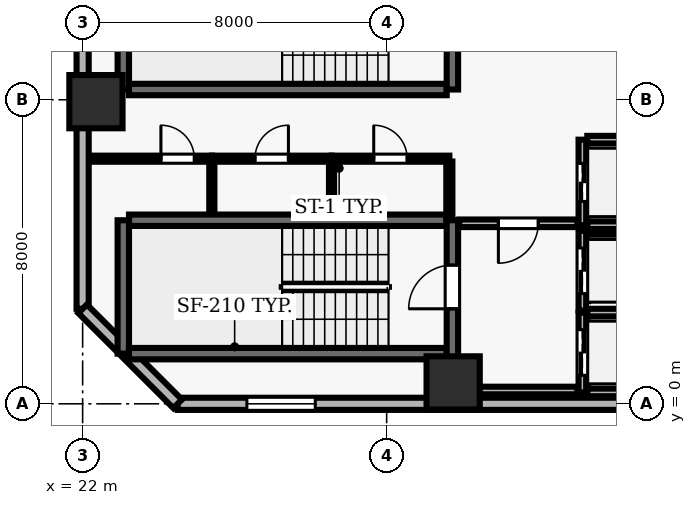
"""IFC4 building model, lengths in metres.
Left out: names, types, materials, properties, quantities, classifications, styles, units other than length and angle.
Written with IfcOpenShell. Run it as: python <this file> out.ifc"""

import sys

from ifc_helpers import new_model, si_unit, direction, frame, frame_2d, origin, origin_2d, place, context, subcontext, project, spatial, rectangle, extrude, element, fill, save


model = new_model("IFC4")
c1 = context("Model", 3, precision=1e-05, world=origin(), true_north=direction((0.0, 1.0)))
c2 = subcontext(c1, "Body", "Model", "MODEL_VIEW")
j1 = project(units=[si_unit("LENGTHUNIT", "METRE"), si_unit("PLANEANGLEUNIT", "RADIAN")], contexts=[c1])
p1 = place(None, origin())
s1 = spatial("IfcSite", under=j1, at=p1, CompositionType="ELEMENT")
p2 = place(p1, origin())
s2 = spatial("IfcBuilding", under=s1, at=p2, CompositionType="ELEMENT")
p3 = place(p2, frame((0.0, 0.0, 62.2)))
s3 = spatial("IfcBuildingStorey", under=s2, at=p3, CompositionType="ELEMENT", Elevation=62.2)
for number, where, z_axis, x_axis in (
    (1, (31.75, 0.55, 0.0), (0.0, 0.0, 1.0), (1.0, 0.0, 0.0)),
    (2, (22.35, 7.95, 0.0), (0.0, 0.0, 1.0), (1.0, 0.0, 0.0)),
):
    element("IfcColumn", number, at=place(p3, frame(where, z_axis=z_axis, x_axis=x_axis)), inside=s3, PredefinedType="COLUMN", context=c2, shape_type="SweptSolid", body=[
        extrude(rectangle(XDim=1.4, YDim=1.4, at=origin_2d()), origin(), (0.0, 0.0, 1.0), 3.9),
    ])
p4 = place(p3, frame((24.5, 0.0, 0.0), z_axis=(0.0, 0.0, 1.0), x_axis=(1.0, 0.0, 0.0)))
e3 = element("IfcWall", 3, at=p4, inside=s3, PredefinedType="SOLIDWALL", context=c2, shape_type="SweptSolid", body=[
    extrude(rectangle(XDim=49.0, YDim=0.32, at=frame_2d((24.5, 0.0))), origin(), (0.0, 0.0, 1.0), 3.69),
])
p5 = place(p4, frame((1.822, 0.0, 0.9)))
e4 = element("IfcOpeningElement", 4, at=p5, cuts=e3, PredefinedType="OPENING", context=c2, shape_type="SweptSolid", body=[
    extrude(rectangle(XDim=1.8, YDim=1.6, at=frame_2d((0.9, 0.8))), frame((0.0, 0.17, 0.0), z_axis=(0.0, -1.0, 0.0), x_axis=(1.0, 0.0, 0.0)), (0.0, 0.0, 1.0), 0.34),
])
p6 = place(p4, frame((18.156, 0.0, 0.9)))
e5 = element("IfcOpeningElement", 5, at=p6, cuts=e3, PredefinedType="OPENING", context=c2, shape_type="SweptSolid", body=[
    extrude(rectangle(XDim=1.8, YDim=1.6, at=frame_2d((0.9, 0.8))), frame((0.0, 0.17, 0.0), z_axis=(0.0, -1.0, 0.0), x_axis=(1.0, 0.0, 0.0)), (0.0, 0.0, 1.0), 0.34),
])
p7 = place(p4, frame((24.05, 0.0, 0.9)))
e6 = element("IfcOpeningElement", 6, at=p7, cuts=e3, PredefinedType="OPENING", context=c2, shape_type="SweptSolid", body=[
    extrude(rectangle(XDim=1.8, YDim=1.6, at=frame_2d((0.9, 0.8))), frame((0.0, 0.17, 0.0), z_axis=(0.0, -1.0, 0.0), x_axis=(1.0, 0.0, 0.0)), (0.0, 0.0, 1.0), 0.34),
])
p8 = place(p4, frame((28.144, 0.0, 0.9)))
e7 = element("IfcOpeningElement", 7, at=p8, cuts=e3, PredefinedType="OPENING", context=c2, shape_type="SweptSolid", body=[
    extrude(rectangle(XDim=1.8, YDim=1.6, at=frame_2d((0.9, 0.8))), frame((0.0, 0.17, 0.0), z_axis=(0.0, -1.0, 0.0), x_axis=(1.0, 0.0, 0.0)), (0.0, 0.0, 1.0), 0.34),
])
p9 = place(p4, frame((34.489, 0.0, 0.9)))
e8 = element("IfcOpeningElement", 8, at=p9, cuts=e3, PredefinedType="OPENING", context=c2, shape_type="SweptSolid", body=[
    extrude(rectangle(XDim=1.8, YDim=1.6, at=frame_2d((0.9, 0.8))), frame((0.0, 0.17, 0.0), z_axis=(0.0, -1.0, 0.0), x_axis=(1.0, 0.0, 0.0)), (0.0, 0.0, 1.0), 0.34),
])
p10 = place(p4, frame((39.933, 0.0, 0.9)))
e9 = element("IfcOpeningElement", 9, at=p10, cuts=e3, PredefinedType="OPENING", context=c2, shape_type="SweptSolid", body=[
    extrude(rectangle(XDim=1.8, YDim=1.6, at=frame_2d((0.9, 0.8))), frame((0.0, 0.17, 0.0), z_axis=(0.0, -1.0, 0.0), x_axis=(1.0, 0.0, 0.0)), (0.0, 0.0, 1.0), 0.34),
])
p11 = place(p4, frame((45.828, 0.0, 0.9)))
e10 = element("IfcOpeningElement", 10, at=p11, cuts=e3, PredefinedType="OPENING", context=c2, shape_type="SweptSolid", body=[
    extrude(rectangle(XDim=1.8, YDim=1.6, at=frame_2d((0.9, 0.8))), frame((0.0, 0.17, 0.0), z_axis=(0.0, -1.0, 0.0), x_axis=(1.0, 0.0, 0.0)), (0.0, 0.0, 1.0), 0.34),
])
p12 = place(p3, frame((22.0, 51.5, 0.0), z_axis=(0.0, 0.0, 1.0), x_axis=(0.0, -1.0, 0.0)))
e11 = element("IfcWall", 11, at=p12, inside=s3, PredefinedType="SOLIDWALL", context=c2, shape_type="SweptSolid", body=[
    extrude(rectangle(XDim=49.0, YDim=0.32, at=frame_2d((24.5, 0.0))), origin(), (0.0, 0.0, 1.0), 3.69),
])
p13 = place(p12, frame((12.1, 0.0, 0.0)))
e12 = element("IfcOpeningElement", 12, at=p13, cuts=e11, PredefinedType="OPENING", context=c2, shape_type="SweptSolid", body=[
    extrude(rectangle(XDim=1.0, YDim=2.2, at=frame_2d((0.5, 1.1))), frame((0.0, 0.17, 0.0), z_axis=(0.0, -1.0, 0.0), x_axis=(1.0, 0.0, 0.0)), (0.0, 0.0, 1.0), 0.34),
])
p14 = place(p12, frame((1.822, 0.0, 0.9)))
e13 = element("IfcOpeningElement", 13, at=p14, cuts=e11, PredefinedType="OPENING", context=c2, shape_type="SweptSolid", body=[
    extrude(rectangle(XDim=1.8, YDim=1.6, at=frame_2d((0.9, 0.8))), frame((0.0, 0.17, 0.0), z_axis=(0.0, -1.0, 0.0), x_axis=(1.0, 0.0, 0.0)), (0.0, 0.0, 1.0), 0.34),
])
p15 = place(p12, frame((7.267, 0.0, 0.9)))
e14 = element("IfcOpeningElement", 14, at=p15, cuts=e11, PredefinedType="OPENING", context=c2, shape_type="SweptSolid", body=[
    extrude(rectangle(XDim=1.8, YDim=1.6, at=frame_2d((0.9, 0.8))), frame((0.0, 0.17, 0.0), z_axis=(0.0, -1.0, 0.0), x_axis=(1.0, 0.0, 0.0)), (0.0, 0.0, 1.0), 0.34),
])
p16 = place(p12, frame((18.156, 0.0, 0.9)))
e15 = element("IfcOpeningElement", 15, at=p16, cuts=e11, PredefinedType="OPENING", context=c2, shape_type="SweptSolid", body=[
    extrude(rectangle(XDim=1.8, YDim=1.6, at=frame_2d((0.9, 0.8))), frame((0.0, 0.17, 0.0), z_axis=(0.0, -1.0, 0.0), x_axis=(1.0, 0.0, 0.0)), (0.0, 0.0, 1.0), 0.34),
])
p17 = place(p12, frame((23.15, 0.0, 0.9)))
e16 = element("IfcOpeningElement", 16, at=p17, cuts=e11, PredefinedType="OPENING", context=c2, shape_type="SweptSolid", body=[
    extrude(rectangle(XDim=1.8, YDim=1.6, at=frame_2d((0.9, 0.8))), frame((0.0, 0.17, 0.0), z_axis=(0.0, -1.0, 0.0), x_axis=(1.0, 0.0, 0.0)), (0.0, 0.0, 1.0), 0.34),
])
p18 = place(p12, frame((29.044, 0.0, 0.9)))
e17 = element("IfcOpeningElement", 17, at=p18, cuts=e11, PredefinedType="OPENING", context=c2, shape_type="SweptSolid", body=[
    extrude(rectangle(XDim=1.8, YDim=1.6, at=frame_2d((0.9, 0.8))), frame((0.0, 0.17, 0.0), z_axis=(0.0, -1.0, 0.0), x_axis=(1.0, 0.0, 0.0)), (0.0, 0.0, 1.0), 0.34),
])
p19 = place(p12, frame((34.039, 0.0, 0.9)))
e18 = element("IfcOpeningElement", 18, at=p19, cuts=e11, PredefinedType="OPENING", context=c2, shape_type="SweptSolid", body=[
    extrude(rectangle(XDim=1.8, YDim=1.6, at=frame_2d((0.9, 0.8))), frame((0.0, 0.17, 0.0), z_axis=(0.0, -1.0, 0.0), x_axis=(1.0, 0.0, 0.0)), (0.0, 0.0, 1.0), 0.34),
])
p20 = place(p12, frame((39.933, 0.0, 0.9)))
e19 = element("IfcOpeningElement", 19, at=p20, cuts=e11, PredefinedType="OPENING", context=c2, shape_type="SweptSolid", body=[
    extrude(rectangle(XDim=1.8, YDim=1.6, at=frame_2d((0.9, 0.8))), frame((0.0, 0.17, 0.0), z_axis=(0.0, -1.0, 0.0), x_axis=(1.0, 0.0, 0.0)), (0.0, 0.0, 1.0), 0.34),
])
p21 = place(p3, frame((22.0, 2.5, 0.0), z_axis=(0.0, 0.0, 1.0), x_axis=(0.707106781187, -0.707106781187, 0.0)))
e20 = element("IfcWall", 20, at=p21, inside=s3, PredefinedType="SOLIDWALL", context=c2, shape_type="SweptSolid", body=[
    extrude(rectangle(XDim=3.536, YDim=0.32, at=frame_2d((1.768, 0.0))), origin(), (0.0, 0.0, 1.0), 3.69),
])
p22 = place(p3, frame((31.58, 4.83, 0.0), z_axis=(0.0, 0.0, 1.0), x_axis=(-1.0, 0.0, 0.0)))
e21 = element("IfcWall", 21, at=p22, inside=s3, PredefinedType="SHEAR", context=c2, shape_type="SweptSolid", body=[
    extrude(rectangle(XDim=8.36, YDim=0.3, at=frame_2d((4.18, 0.0))), origin(), (0.0, 0.0, 1.0), 3.69),
])
p23 = place(p3, frame((23.07, 4.83, 0.0), z_axis=(0.0, 0.0, 1.0), x_axis=(0.0, -1.0, 0.0)))
e22 = element("IfcWall", 22, at=p23, inside=s3, PredefinedType="SHEAR", context=c2, shape_type="SweptSolid", body=[
    extrude(rectangle(XDim=3.51, YDim=0.3, at=frame_2d((1.755, 0.0))), origin(), (0.0, 0.0, 1.0), 3.69),
])
p24 = place(p3, frame((23.22, 1.32, 0.0), z_axis=(0.0, 0.0, 1.0), x_axis=(1.0, 0.0, 0.0)))
e23 = element("IfcWall", 23, at=p24, inside=s3, PredefinedType="SHEAR", context=c2, shape_type="SweptSolid", body=[
    extrude(rectangle(XDim=8.36, YDim=0.3, at=frame_2d((4.18, 0.0))), origin(), (0.0, 0.0, 1.0), 3.69),
])
p25 = place(p3, frame((31.73, 0.96, 0.0), z_axis=(0.0, 0.0, 1.0), x_axis=(0.0, 1.0, 0.0)))
e24 = element("IfcWall", 24, at=p25, inside=s3, PredefinedType="SHEAR", context=c2, shape_type="SweptSolid", body=[
    extrude(rectangle(XDim=3.87, YDim=0.3, at=frame_2d((1.935, 0.0))), origin(), (0.0, 0.0, 1.0), 3.69),
])
p26 = place(p25, frame((1.54, 0.0, 0.0)))
e25 = element("IfcOpeningElement", 25, at=p26, cuts=e24, PredefinedType="OPENING", context=c2, shape_type="SweptSolid", body=[
    extrude(rectangle(XDim=1.15, YDim=2.15, at=frame_2d((0.575, 1.075))), frame((0.0, 0.16, 0.0), z_axis=(0.0, -1.0, 0.0), x_axis=(1.0, 0.0, 0.0)), (0.0, 0.0, 1.0), 0.32),
])
p27 = place(p3, frame((23.07, 11.78, 0.0), z_axis=(0.0, 0.0, 1.0), x_axis=(0.0, -1.0, 0.0)))
e26 = element("IfcWall", 26, at=p27, inside=s3, PredefinedType="SHEAR", context=c2, shape_type="SweptSolid", body=[
    extrude(rectangle(XDim=3.51, YDim=0.3, at=frame_2d((1.755, 0.0))), origin(), (0.0, 0.0, 1.0), 3.69),
])
p28 = place(p3, frame((23.22, 8.27, 0.0), z_axis=(0.0, 0.0, 1.0), x_axis=(1.0, 0.0, 0.0)))
e27 = element("IfcWall", 27, at=p28, inside=s3, PredefinedType="SHEAR", context=c2, shape_type="SweptSolid", body=[
    extrude(rectangle(XDim=8.36, YDim=0.3, at=frame_2d((4.18, 0.0))), origin(), (0.0, 0.0, 1.0), 3.69),
])
p29 = place(p3, frame((31.73, 8.27, 0.0), z_axis=(0.0, 0.0, 1.0), x_axis=(0.0, 1.0, 0.0)))
e28 = element("IfcWall", 28, at=p29, inside=s3, PredefinedType="SHEAR", context=c2, shape_type="SweptSolid", body=[
    extrude(rectangle(XDim=3.51, YDim=0.3, at=frame_2d((1.755, 0.0))), origin(), (0.0, 0.0, 1.0), 3.69),
])
p30 = place(p29, frame((1.18, 0.0, 0.0)))
e29 = element("IfcOpeningElement", 29, at=p30, cuts=e28, PredefinedType="OPENING", context=c2, shape_type="SweptSolid", body=[
    extrude(rectangle(XDim=1.15, YDim=2.15, at=frame_2d((0.575, 1.075))), frame((0.0, 0.16, 0.0), z_axis=(0.0, -1.0, 0.0), x_axis=(1.0, 0.0, 0.0)), (0.0, 0.0, 1.0), 0.32),
])
p31 = place(p3, frame((35.15, 2.4, 0.0), z_axis=(0.0, 0.0, 1.0), x_axis=(0.0, -1.0, 0.0)))
e30 = element("IfcWall", 30, at=p31, inside=s3, PredefinedType="SOLIDWALL", context=c2, shape_type="SweptSolid", body=[
    extrude(rectangle(XDim=2.1, YDim=0.2, at=frame_2d((1.05, 0.0))), origin(), (0.0, 0.0, 1.0), 3.69),
])
p32 = place(p31, frame((0.45, 0.0, 0.0)))
e31 = element("IfcOpeningElement", 31, at=p32, cuts=e30, PredefinedType="OPENING", context=c2, shape_type="SweptSolid", body=[
    extrude(rectangle(XDim=1.2, YDim=2.15, at=frame_2d((0.6, 1.075))), frame((0.0, 0.11, 0.0), z_axis=(0.0, -1.0, 0.0), x_axis=(1.0, 0.0, 0.0)), (0.0, 0.0, 1.0), 0.22),
])
for number, where, z_axis, x_axis in (
    (32, (35.28, 0.3, 0.0), (0.0, 0.0, 1.0), (1.0, 0.0, 0.0)),
    (33, (37.42, 2.4, 0.0), (0.0, 0.0, 1.0), (-1.0, 0.0, 0.0)),
):
    element("IfcWall", number, at=place(p3, frame(where, z_axis=z_axis, x_axis=x_axis)), inside=s3, PredefinedType="SOLIDWALL", context=c2, shape_type="SweptSolid", body=[
        extrude(rectangle(XDim=2.14, YDim=0.2, at=frame_2d((1.07, 0.0))), origin(), (0.0, 0.0, 1.0), 3.69),
    ])
p33 = place(p3, frame((35.15, 4.55, 0.0), z_axis=(0.0, 0.0, 1.0), x_axis=(0.0, -1.0, 0.0)))
e34 = element("IfcWall", 34, at=p33, inside=s3, PredefinedType="SOLIDWALL", context=c2, shape_type="SweptSolid", body=[
    extrude(rectangle(XDim=2.1, YDim=0.2, at=frame_2d((1.05, 0.0))), origin(), (0.0, 0.0, 1.0), 3.69),
])
p34 = place(p33, frame((0.45, 0.0, 0.0)))
e35 = element("IfcOpeningElement", 35, at=p34, cuts=e34, PredefinedType="OPENING", context=c2, shape_type="SweptSolid", body=[
    extrude(rectangle(XDim=1.2, YDim=2.15, at=frame_2d((0.6, 1.075))), frame((0.0, 0.11, 0.0), z_axis=(0.0, -1.0, 0.0), x_axis=(1.0, 0.0, 0.0)), (0.0, 0.0, 1.0), 0.22),
])
p35 = place(p3, frame((37.42, 4.55, 0.0), z_axis=(0.0, 0.0, 1.0), x_axis=(-1.0, 0.0, 0.0)))
e36 = element("IfcWall", 36, at=p35, inside=s3, PredefinedType="SOLIDWALL", context=c2, shape_type="SweptSolid", body=[
    extrude(rectangle(XDim=2.14, YDim=0.2, at=frame_2d((1.07, 0.0))), origin(), (0.0, 0.0, 1.0), 3.69),
])
p36 = place(p3, frame((35.15, 6.95, 0.0), z_axis=(0.0, 0.0, 1.0), x_axis=(0.0, -1.0, 0.0)))
e37 = element("IfcWall", 37, at=p36, inside=s3, PredefinedType="SOLIDWALL", context=c2, shape_type="SweptSolid", body=[
    extrude(rectangle(XDim=2.25, YDim=0.2, at=frame_2d((1.125, 0.0))), origin(), (0.0, 0.0, 1.0), 3.69),
])
p37 = place(p36, frame((0.625, 0.0, 0.0)))
e38 = element("IfcOpeningElement", 38, at=p37, cuts=e37, PredefinedType="OPENING", context=c2, shape_type="SweptSolid", body=[
    extrude(rectangle(XDim=1.0, YDim=2.1, at=frame_2d((0.5, 1.05))), frame((0.0, 0.11, 0.0), z_axis=(0.0, -1.0, 0.0), x_axis=(1.0, 0.0, 0.0)), (0.0, 0.0, 1.0), 0.22),
])
for number, where, z_axis, x_axis in (
    (39, (35.28, 4.7, 0.0), (0.0, 0.0, 1.0), (1.0, 0.0, 0.0)),
    (40, (37.42, 6.95, 0.0), (0.0, 0.0, 1.0), (-1.0, 0.0, 0.0)),
):
    element("IfcWall", number, at=place(p3, frame(where, z_axis=z_axis, x_axis=x_axis)), inside=s3, PredefinedType="SOLIDWALL", context=c2, shape_type="SweptSolid", body=[
        extrude(rectangle(XDim=2.14, YDim=0.2, at=frame_2d((1.07, 0.0))), origin(), (0.0, 0.0, 1.0), 3.69),
    ])
p38 = place(p3, frame((22.2, 6.45, 0.0), z_axis=(0.0, 0.0, 1.0), x_axis=(1.0, 0.0, 0.0)))
e41 = element("IfcWall", 41, at=p38, inside=s3, PredefinedType="PARTITIONING", context=c2, shape_type="SweptSolid", body=[
    extrude(rectangle(XDim=3.2, YDim=0.16, at=frame_2d((1.6, 0.0))), origin(), (0.0, 0.0, 1.0), 3.69),
])
p39 = place(p38, frame((1.86, 0.0, 0.0)))
e42 = element("IfcOpeningElement", 42, at=p39, cuts=e41, PredefinedType="OPENING", context=c2, shape_type="SweptSolid", body=[
    extrude(rectangle(XDim=0.88, YDim=2.1, at=frame_2d((0.44, 1.05))), frame((0.0, 0.09, 0.0), z_axis=(0.0, -1.0, 0.0), x_axis=(1.0, 0.0, 0.0)), (0.0, 0.0, 1.0), 0.18),
])
p40 = place(p3, frame((25.4, 6.45, 0.0), z_axis=(0.0, 0.0, 1.0), x_axis=(1.0, 0.0, 0.0)))
e43 = element("IfcWall", 43, at=p40, inside=s3, PredefinedType="PARTITIONING", context=c2, shape_type="SweptSolid", body=[
    extrude(rectangle(XDim=3.15, YDim=0.16, at=frame_2d((1.575, 0.0))), origin(), (0.0, 0.0, 1.0), 3.69),
])
p41 = place(p40, frame((1.135, 0.0, 0.0)))
e44 = element("IfcOpeningElement", 44, at=p41, cuts=e43, PredefinedType="OPENING", context=c2, shape_type="SweptSolid", body=[
    extrude(rectangle(XDim=0.88, YDim=2.1, at=frame_2d((0.44, 1.05))), frame((0.0, 0.09, 0.0), z_axis=(0.0, -1.0, 0.0), x_axis=(1.0, 0.0, 0.0)), (0.0, 0.0, 1.0), 0.18),
])
p42 = place(p3, frame((28.55, 6.45, 0.0), z_axis=(0.0, 0.0, 1.0), x_axis=(1.0, 0.0, 0.0)))
e45 = element("IfcWall", 45, at=p42, inside=s3, PredefinedType="PARTITIONING", context=c2, shape_type="SweptSolid", body=[
    extrude(rectangle(XDim=3.1, YDim=0.16, at=frame_2d((1.55, 0.0))), origin(), (0.0, 0.0, 1.0), 3.69),
])
p43 = place(p42, frame((1.11, 0.0, 0.0)))
e46 = element("IfcOpeningElement", 46, at=p43, cuts=e45, PredefinedType="OPENING", context=c2, shape_type="SweptSolid", body=[
    extrude(rectangle(XDim=0.88, YDim=2.1, at=frame_2d((0.44, 1.05))), frame((0.0, 0.09, 0.0), z_axis=(0.0, -1.0, 0.0), x_axis=(1.0, 0.0, 0.0)), (0.0, 0.0, 1.0), 0.18),
])
p44 = place(p3, frame((31.65, 0.35, 0.0), z_axis=(0.0, 0.0, 1.0), x_axis=(1.0, 0.0, 0.0)))
e47 = element("IfcWall", 47, at=p44, inside=s3, PredefinedType="SOLIDWALL", context=c2, shape_type="SweptSolid", body=[
    extrude(rectangle(XDim=3.37, YDim=0.2, at=frame_2d((1.685, 0.0))), origin(), (0.0, 0.0, 1.0), 3.69),
])
p45 = place(p3, frame((35.02, 4.75, 0.0), z_axis=(0.0, 0.0, 1.0), x_axis=(-1.0, 0.0, 0.0)))
e48 = element("IfcWall", 48, at=p45, inside=s3, PredefinedType="SOLIDWALL", context=c2, shape_type="SweptSolid", body=[
    extrude(rectangle(XDim=3.11, YDim=0.2, at=frame_2d((1.555, 0.0))), origin(), (0.0, 0.0, 1.0), 3.69),
])
p46 = place(p45, frame((1.03, 0.0, 0.0)))
e49 = element("IfcOpeningElement", 49, at=p46, cuts=e48, PredefinedType="OPENING", context=c2, shape_type="SweptSolid", body=[
    extrude(rectangle(XDim=1.05, YDim=2.15, at=frame_2d((0.525, 1.075))), frame((0.0, 0.11, 0.0), z_axis=(0.0, -1.0, 0.0), x_axis=(1.0, 0.0, 0.0)), (0.0, 0.0, 1.0), 0.22),
])
for number, where, z_axis, x_axis in (
    (50, (25.4, 5.01, 0.0), (0.0, 0.0, 1.0), (0.0, 1.0, 0.0)),
    (51, (28.55, 5.01, 0.0), (0.0, 0.0, 1.0), (0.0, 1.0, 0.0)),
):
    element("IfcWall", number, at=place(p3, frame(where, z_axis=z_axis, x_axis=x_axis)), inside=s3, PredefinedType="PARTITIONING", context=c2, shape_type="SweptSolid", body=[
        extrude(rectangle(XDim=1.365, YDim=0.135, at=frame_2d((0.683, 0.0))), origin(), (0.0, 0.0, 1.0), 3.69),
    ])
p47 = place(p3, frame((31.65, 4.86, 0.0), z_axis=(0.0, 0.0, 1.0), x_axis=(0.0, 1.0, 0.0)))
e52 = element("IfcWall", 52, at=p47, inside=s3, PredefinedType="PARTITIONING", context=c2, shape_type="SweptSolid", body=[
    extrude(rectangle(XDim=1.515, YDim=0.16, at=frame_2d((0.757, 0.0))), origin(), (0.0, 0.0, 1.0), 3.69),
])
p48 = place(p5, origin())
e53 = element("IfcWindow", 53, at=p48, inside=s3, PartitioningType="SINGLE_PANEL", PredefinedType="WINDOW", context=c2, shape_type="SweptSolid", body=[
    extrude(rectangle(XDim=1.8, YDim=1.6, at=frame_2d((0.9, 0.8))), frame((0.0, 0.03, 0.0), z_axis=(0.0, -1.0, 0.0), x_axis=(1.0, 0.0, 0.0)), (0.0, 0.0, 1.0), 0.06),
])
fill(e4, e53)
p49 = place(p26, origin())
e54 = element("IfcDoor", 54, at=p49, inside=s3, OperationType="SINGLE_SWING_LEFT", PredefinedType="DOOR", context=c2, shape_type="SweptSolid", body=[
    extrude(rectangle(XDim=1.15, YDim=2.15, at=frame_2d((0.575, 1.075))), frame((0.0, 0.025, 0.0), z_axis=(0.0, -1.0, 0.0), x_axis=(1.0, 0.0, 0.0)), (0.0, 0.0, 1.0), 0.05),
])
fill(e25, e54)
p50 = place(p32, origin())
e55 = element("IfcDoor", 55, at=p50, inside=s3, OperationType="DOUBLE_DOOR_SLIDING", PredefinedType="DOOR", context=c2, shape_type="SweptSolid", body=[
    extrude(rectangle(XDim=1.2, YDim=2.15, at=frame_2d((0.6, 1.075))), frame((0.0, 0.025, 0.0), z_axis=(0.0, -1.0, 0.0), x_axis=(1.0, 0.0, 0.0)), (0.0, 0.0, 1.0), 0.05),
])
fill(e31, e55)
p51 = place(p34, origin())
e56 = element("IfcDoor", 56, at=p51, inside=s3, OperationType="DOUBLE_DOOR_SLIDING", PredefinedType="DOOR", context=c2, shape_type="SweptSolid", body=[
    extrude(rectangle(XDim=1.2, YDim=2.15, at=frame_2d((0.6, 1.075))), frame((0.0, 0.025, 0.0), z_axis=(0.0, -1.0, 0.0), x_axis=(1.0, 0.0, 0.0)), (0.0, 0.0, 1.0), 0.05),
])
fill(e35, e56)
p52 = place(p37, origin())
e57 = element("IfcDoor", 57, at=p52, inside=s3, OperationType="DOUBLE_DOOR_SLIDING", PredefinedType="DOOR", context=c2, shape_type="SweptSolid", body=[
    extrude(rectangle(XDim=1.0, YDim=2.1, at=frame_2d((0.5, 1.05))), frame((0.0, 0.025, 0.0), z_axis=(0.0, -1.0, 0.0), x_axis=(1.0, 0.0, 0.0)), (0.0, 0.0, 1.0), 0.05),
])
fill(e38, e57)
p53 = place(p46, origin())
e58 = element("IfcDoor", 58, at=p53, inside=s3, OperationType="SINGLE_SWING_RIGHT", PredefinedType="DOOR", context=c2, shape_type="SweptSolid", body=[
    extrude(rectangle(XDim=1.05, YDim=2.15, at=frame_2d((0.525, 1.075))), frame((0.0, 0.025, 0.0), z_axis=(0.0, -1.0, 0.0), x_axis=(1.0, 0.0, 0.0)), (0.0, 0.0, 1.0), 0.05),
])
fill(e49, e58)
p54 = place(p39, origin())
e59 = element("IfcDoor", 59, at=p54, inside=s3, OperationType="SINGLE_SWING_LEFT", PredefinedType="DOOR", context=c2, shape_type="SweptSolid", body=[
    extrude(rectangle(XDim=0.88, YDim=2.1, at=frame_2d((0.44, 1.05))), frame((0.0, 0.025, 0.0), z_axis=(0.0, -1.0, 0.0), x_axis=(1.0, 0.0, 0.0)), (0.0, 0.0, 1.0), 0.05),
])
fill(e42, e59)
p55 = place(p41, origin())
e60 = element("IfcDoor", 60, at=p55, inside=s3, OperationType="SINGLE_SWING_RIGHT", PredefinedType="DOOR", context=c2, shape_type="SweptSolid", body=[
    extrude(rectangle(XDim=0.88, YDim=2.1, at=frame_2d((0.44, 1.05))), frame((0.0, 0.025, 0.0), z_axis=(0.0, -1.0, 0.0), x_axis=(1.0, 0.0, 0.0)), (0.0, 0.0, 1.0), 0.05),
])
fill(e44, e60)
p56 = place(p43, origin())
e61 = element("IfcDoor", 61, at=p56, inside=s3, OperationType="SINGLE_SWING_LEFT", PredefinedType="DOOR", context=c2, shape_type="SweptSolid", body=[
    extrude(rectangle(XDim=0.88, YDim=2.1, at=frame_2d((0.44, 1.05))), frame((0.0, 0.025, 0.0), z_axis=(0.0, -1.0, 0.0), x_axis=(1.0, 0.0, 0.0)), (0.0, 0.0, 1.0), 0.05),
])
fill(e46, e61)
save(model, sys.argv[1])
